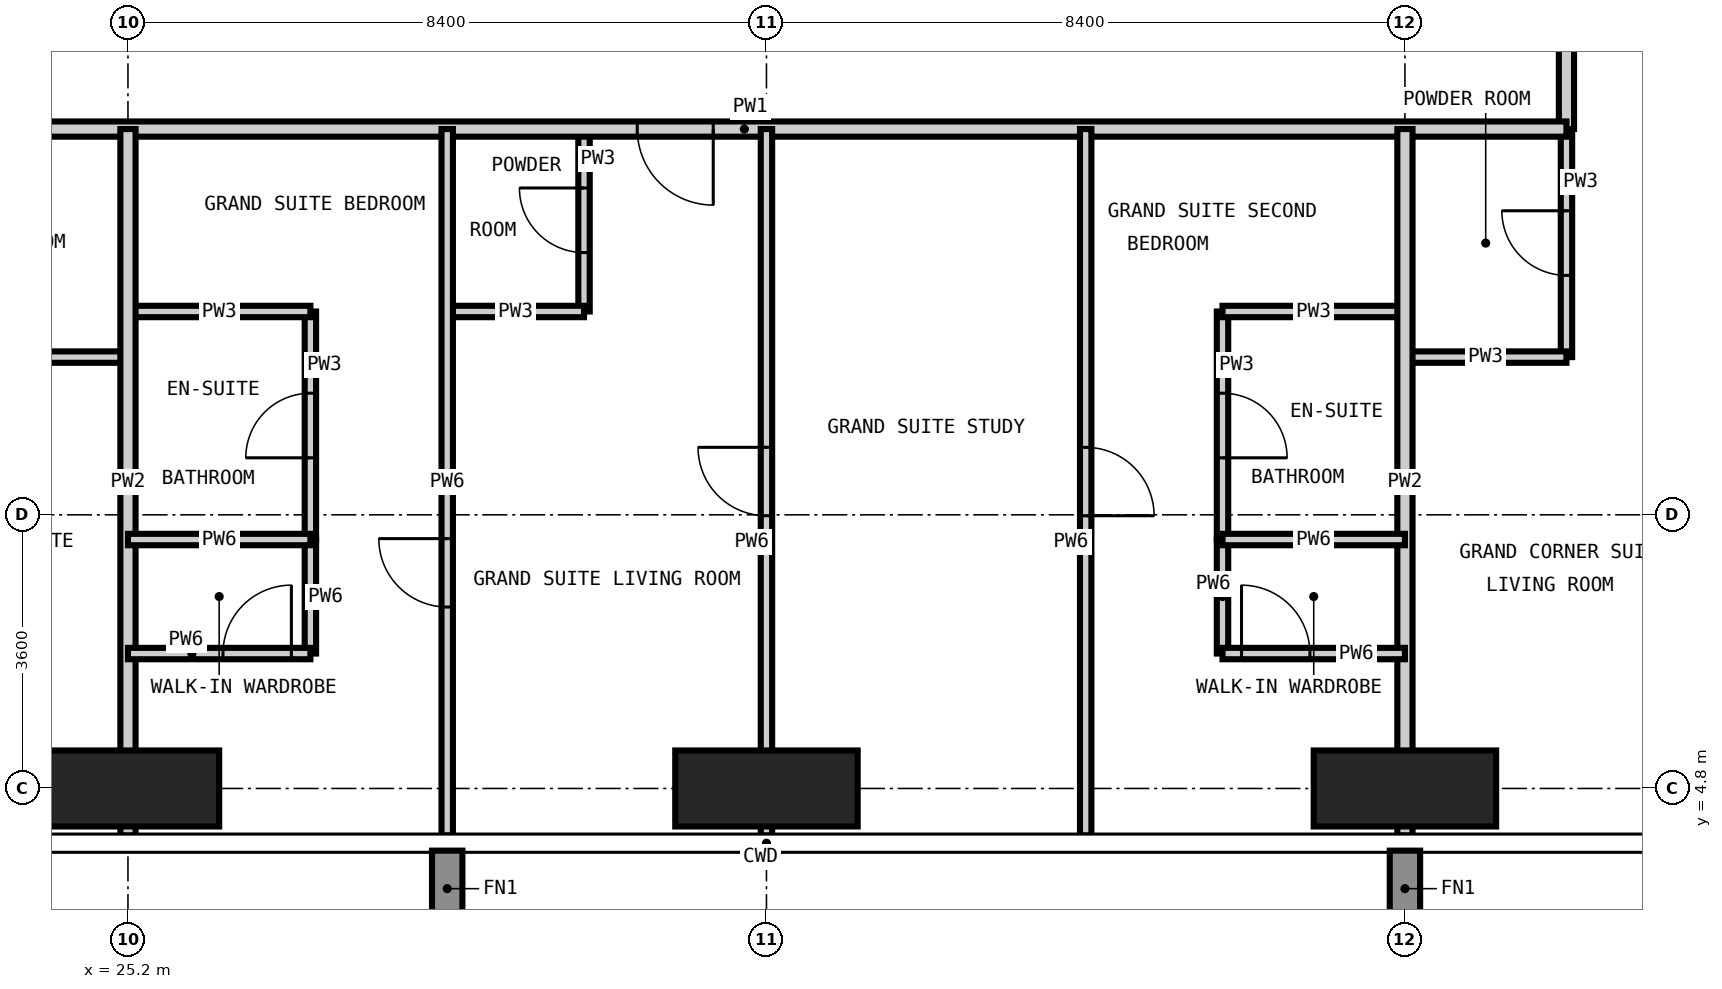
"""IFC4 building model, lengths in metres.
Left out: names, types, materials, properties, quantities, classifications, styles, units other than length and angle.
Written with IfcOpenShell. Run it as: python <this file> out.ifc"""

import sys

from ifc_helpers import new_model, si_unit, direction, frame, frame_2d, origin, origin_2d, place, context, subcontext, project, spatial, rectangle, extrude, element, fill, save


model = new_model("IFC4")
c1 = context("Model", 3, precision=1e-05, world=origin(), true_north=direction((0.0, 1.0)))
c2 = subcontext(c1, "Body", "Model", "MODEL_VIEW")
j1 = project(units=[si_unit("LENGTHUNIT", "METRE"), si_unit("PLANEANGLEUNIT", "RADIAN")], contexts=[c1])
p1 = place(None, origin())
s1 = spatial("IfcSite", under=j1, at=p1, CompositionType="ELEMENT")
p2 = place(p1, origin())
s2 = spatial("IfcBuilding", under=s1, at=p2, CompositionType="ELEMENT")
p3 = place(p2, frame((0.0, 0.0, 276.3)))
s3 = spatial("IfcBuildingStorey", under=s2, at=p3, CompositionType="ELEMENT", Elevation=276.3)
for number, where, z_axis, x_axis in (
    (1, (25.2, 4.8, -0.35), (0.0, 0.0, 1.0), (1.0, 0.0, 0.0)),
    (2, (33.6, 4.8, -0.35), (0.0, 0.0, 1.0), (1.0, 0.0, 0.0)),
    (3, (42.0, 4.8, -0.35), (0.0, 0.0, 1.0), (1.0, 0.0, 0.0)),
):
    element("IfcColumn", number, at=place(p3, frame(where, z_axis=z_axis, x_axis=x_axis)), inside=s3, PredefinedType="COLUMN", context=c2, shape_type="SweptSolid", body=[
        extrude(rectangle(XDim=2.4, YDim=1.0, at=origin_2d()), origin(), (0.0, 0.0, 1.0), 3.9),
    ])
p4 = place(p3, frame((27.6, 8.075, 0.0), z_axis=(0.0, 0.0, 1.0), x_axis=(0.0, 1.0, 0.0)))
e4 = element("IfcWall", 4, at=p4, inside=s3, PredefinedType="PARTITIONING", context=c2, shape_type="SweptSolid", body=[
    extrude(rectangle(XDim=3.0, YDim=0.15, at=frame_2d((1.5, 0.0))), origin(), (0.0, 0.0, 1.0), 3.55),
])
p5 = place(p4, frame((1.075, 0.0, 0.0)))
e5 = element("IfcOpeningElement", 5, at=p5, cuts=e4, PredefinedType="OPENING", context=c2, shape_type="SweptSolid", body=[
    extrude(rectangle(XDim=0.85, YDim=2.1, at=frame_2d((0.425, 1.05))), frame((0.0, 0.085, 0.0), z_axis=(0.0, -1.0, 0.0), x_axis=(1.0, 0.0, 0.0)), (0.0, 0.0, 1.0), 0.17),
])
p6 = place(p3, frame((31.2, 11.075, 0.0), z_axis=(0.0, 0.0, 1.0), x_axis=(0.0, 1.0, 0.0)))
e6 = element("IfcWall", 6, at=p6, inside=s3, PredefinedType="PARTITIONING", context=c2, shape_type="SweptSolid", body=[
    extrude(rectangle(XDim=2.4, YDim=0.15, at=frame_2d((1.2, 0.0))), origin(), (0.0, 0.0, 1.0), 3.55),
])
p7 = place(p6, frame((0.775, 0.0, 0.0)))
e7 = element("IfcOpeningElement", 7, at=p7, cuts=e6, PredefinedType="OPENING", context=c2, shape_type="SweptSolid", body=[
    extrude(rectangle(XDim=0.85, YDim=2.1, at=frame_2d((0.425, 1.05))), frame((0.0, 0.085, 0.0), z_axis=(0.0, -1.0, 0.0), x_axis=(1.0, 0.0, 0.0)), (0.0, 0.0, 1.0), 0.17),
])
p8 = place(p3, frame((39.6, 8.075, 0.0), z_axis=(0.0, 0.0, 1.0), x_axis=(0.0, 1.0, 0.0)))
e8 = element("IfcWall", 8, at=p8, inside=s3, PredefinedType="PARTITIONING", context=c2, shape_type="SweptSolid", body=[
    extrude(rectangle(XDim=3.0, YDim=0.15, at=frame_2d((1.5, 0.0))), origin(), (0.0, 0.0, 1.0), 3.55),
])
p9 = place(p8, frame((1.075, 0.0, 0.0)))
e9 = element("IfcOpeningElement", 9, at=p9, cuts=e8, PredefinedType="OPENING", context=c2, shape_type="SweptSolid", body=[
    extrude(rectangle(XDim=0.85, YDim=2.1, at=frame_2d((0.425, 1.05))), frame((0.0, 0.085, 0.0), z_axis=(0.0, -1.0, 0.0), x_axis=(1.0, 0.0, 0.0)), (0.0, 0.0, 1.0), 0.17),
])
p10 = place(p3, frame((44.125, 10.475, 0.0), z_axis=(0.0, 0.0, 1.0), x_axis=(0.0, 1.0, 0.0)))
e10 = element("IfcWall", 10, at=p10, inside=s3, PredefinedType="PARTITIONING", context=c2, shape_type="SweptSolid", body=[
    extrude(rectangle(XDim=3.0, YDim=0.15, at=frame_2d((1.5, 0.0))), origin(), (0.0, 0.0, 1.0), 3.55),
])
p11 = place(p10, frame((1.075, 0.0, 0.0)))
e11 = element("IfcOpeningElement", 11, at=p11, cuts=e10, PredefinedType="OPENING", context=c2, shape_type="SweptSolid", body=[
    extrude(rectangle(XDim=0.85, YDim=2.1, at=frame_2d((0.425, 1.05))), frame((0.0, 0.085, 0.0), z_axis=(0.0, -1.0, 0.0), x_axis=(1.0, 0.0, 0.0)), (0.0, 0.0, 1.0), 0.17),
])
p12 = place(p3, frame((21.875, 10.475, 0.0), z_axis=(0.0, 0.0, 1.0), x_axis=(1.0, 0.0, 0.0)))
e12 = element("IfcWall", 12, at=p12, inside=s3, PredefinedType="PARTITIONING", context=c2, shape_type="SweptSolid", body=[
    extrude(rectangle(XDim=3.325, YDim=0.15, at=frame_2d((1.663, 0.0))), origin(), (0.0, 0.0, 1.0), 3.55),
])
p13 = place(p12, frame((1.238, 0.0, 0.0)))
e13 = element("IfcOpeningElement", 13, at=p13, cuts=e12, PredefinedType="OPENING", context=c2, shape_type="SweptSolid", body=[
    extrude(rectangle(XDim=0.85, YDim=2.1, at=frame_2d((0.425, 1.05))), frame((0.0, 0.085, 0.0), z_axis=(0.0, -1.0, 0.0), x_axis=(1.0, 0.0, 0.0)), (0.0, 0.0, 1.0), 0.17),
])
p14 = place(p3, frame((42.0, 10.475, 0.0), z_axis=(0.0, 0.0, 1.0), x_axis=(1.0, 0.0, 0.0)))
e14 = element("IfcWall", 14, at=p14, inside=s3, PredefinedType="PARTITIONING", context=c2, shape_type="SweptSolid", body=[
    extrude(rectangle(XDim=2.125, YDim=0.15, at=frame_2d((1.062, 0.0))), origin(), (0.0, 0.0, 1.0), 3.55),
])
p15 = place(p3, frame((25.2, 11.075, 0.0), z_axis=(0.0, 0.0, 1.0), x_axis=(1.0, 0.0, 0.0)))
e15 = element("IfcWall", 15, at=p15, inside=s3, PredefinedType="PARTITIONING", context=c2, shape_type="SweptSolid", body=[
    extrude(rectangle(XDim=2.4, YDim=0.15, at=frame_2d((1.2, 0.0))), origin(), (0.0, 0.0, 1.0), 3.55),
])
p16 = place(p3, frame((29.4, 11.075, 0.0), z_axis=(0.0, 0.0, 1.0), x_axis=(1.0, 0.0, 0.0)))
e16 = element("IfcWall", 16, at=p16, inside=s3, PredefinedType="PARTITIONING", context=c2, shape_type="SweptSolid", body=[
    extrude(rectangle(XDim=1.8, YDim=0.15, at=frame_2d((0.9, 0.0))), origin(), (0.0, 0.0, 1.0), 3.55),
])
p17 = place(p3, frame((39.6, 11.075, 0.0), z_axis=(0.0, 0.0, 1.0), x_axis=(1.0, 0.0, 0.0)))
e17 = element("IfcWall", 17, at=p17, inside=s3, PredefinedType="PARTITIONING", context=c2, shape_type="SweptSolid", body=[
    extrude(rectangle(XDim=2.4, YDim=0.15, at=frame_2d((1.2, 0.0))), origin(), (0.0, 0.0, 1.0), 3.55),
])
p18 = place(p3, frame((44.125, 25.2, 0.0), z_axis=(0.0, 0.0, 1.0), x_axis=(0.0, -1.0, 0.0)))
e18 = element("IfcWall", 18, at=p18, inside=s3, PredefinedType="PARTITIONING", context=c2, shape_type="SweptSolid", body=[
    extrude(rectangle(XDim=11.725, YDim=0.2, at=frame_2d((5.862, 0.0))), origin(), (0.0, 0.0, 1.0), 3.55),
])
p19 = place(p18, frame((3.7, 0.0, 0.0)))
e19 = element("IfcOpeningElement", 19, at=p19, cuts=e18, PredefinedType="OPENING", context=c2, shape_type="SweptSolid", body=[
    extrude(rectangle(XDim=1.0, YDim=2.2, at=frame_2d((0.5, 1.1))), frame((0.0, 0.11, 0.0), z_axis=(0.0, -1.0, 0.0), x_axis=(1.0, 0.0, 0.0)), (0.0, 0.0, 1.0), 0.22),
])
p20 = place(p18, frame((9.563, 0.0, 0.0)))
e20 = element("IfcOpeningElement", 20, at=p20, cuts=e18, PredefinedType="OPENING", context=c2, shape_type="SweptSolid", body=[
    extrude(rectangle(XDim=1.0, YDim=2.2, at=frame_2d((0.5, 1.1))), frame((0.0, 0.11, 0.0), z_axis=(0.0, -1.0, 0.0), x_axis=(1.0, 0.0, 0.0)), (0.0, 0.0, 1.0), 0.22),
])
p21 = place(p3, frame((44.125, 13.475, 0.0), z_axis=(0.0, 0.0, 1.0), x_axis=(-1.0, 0.0, 0.0)))
e21 = element("IfcWall", 21, at=p21, inside=s3, PredefinedType="PARTITIONING", context=c2, shape_type="SweptSolid", body=[
    extrude(rectangle(XDim=22.25, YDim=0.2, at=frame_2d((11.125, 0.0))), origin(), (0.0, 0.0, 1.0), 3.55),
])
p22 = place(p21, frame((11.225, 0.0, 0.0)))
e22 = element("IfcOpeningElement", 22, at=p22, cuts=e21, PredefinedType="OPENING", context=c2, shape_type="SweptSolid", body=[
    extrude(rectangle(XDim=1.0, YDim=2.2, at=frame_2d((0.5, 1.1))), frame((0.0, 0.11, 0.0), z_axis=(0.0, -1.0, 0.0), x_axis=(1.0, 0.0, 0.0)), (0.0, 0.0, 1.0), 0.22),
])
for number, where, z_axis, x_axis in (
    (23, (25.2, 4.182, 0.0), (0.0, 0.0, 1.0), (0.0, 1.0, 0.0)),
    (24, (42.0, 4.182, 0.0), (0.0, 0.0, 1.0), (0.0, 1.0, 0.0)),
):
    element("IfcWall", number, at=place(p3, frame(where, z_axis=z_axis, x_axis=x_axis)), inside=s3, PredefinedType="PARTITIONING", context=c2, shape_type="SweptSolid", body=[
        extrude(rectangle(XDim=9.293, YDim=0.2, at=frame_2d((4.646, 0.0))), origin(), (0.0, 0.0, 1.0), 3.55),
    ])
p23 = place(p3, frame((27.6, 6.575, 0.0), z_axis=(0.0, 0.0, 1.0), x_axis=(0.0, 1.0, 0.0)))
e25 = element("IfcWall", 25, at=p23, inside=s3, PredefinedType="PARTITIONING", context=c2, shape_type="SweptSolid", body=[
    extrude(rectangle(XDim=1.5, YDim=0.15, at=frame_2d((0.75, 0.0))), origin(), (0.0, 0.0, 1.0), 3.55),
])
p24 = place(p3, frame((29.4, 4.182, 0.0), z_axis=(0.0, 0.0, 1.0), x_axis=(0.0, 1.0, 0.0)))
e26 = element("IfcWall", 26, at=p24, inside=s3, PredefinedType="PARTITIONING", context=c2, shape_type="SweptSolid", body=[
    extrude(rectangle(XDim=9.293, YDim=0.15, at=frame_2d((4.646, 0.0))), origin(), (0.0, 0.0, 1.0), 3.55),
])
p25 = place(p24, frame((3.005, 0.0, 0.0)))
e27 = element("IfcOpeningElement", 27, at=p25, cuts=e26, PredefinedType="OPENING", context=c2, shape_type="SweptSolid", body=[
    extrude(rectangle(XDim=0.9, YDim=2.1, at=frame_2d((0.45, 1.05))), frame((0.0, 0.085, 0.0), z_axis=(0.0, -1.0, 0.0), x_axis=(1.0, 0.0, 0.0)), (0.0, 0.0, 1.0), 0.17),
])
p26 = place(p3, frame((33.6, 4.182, 0.0), z_axis=(0.0, 0.0, 1.0), x_axis=(0.0, 1.0, 0.0)))
e28 = element("IfcWall", 28, at=p26, inside=s3, PredefinedType="PARTITIONING", context=c2, shape_type="SweptSolid", body=[
    extrude(rectangle(XDim=9.293, YDim=0.15, at=frame_2d((4.646, 0.0))), origin(), (0.0, 0.0, 1.0), 3.55),
])
p27 = place(p26, frame((4.206, 0.0, 0.0)))
e29 = element("IfcOpeningElement", 29, at=p27, cuts=e28, PredefinedType="OPENING", context=c2, shape_type="SweptSolid", body=[
    extrude(rectangle(XDim=0.9, YDim=2.1, at=frame_2d((0.45, 1.05))), frame((0.0, 0.085, 0.0), z_axis=(0.0, -1.0, 0.0), x_axis=(1.0, 0.0, 0.0)), (0.0, 0.0, 1.0), 0.17),
])
p28 = place(p3, frame((37.8, 4.182, 0.0), z_axis=(0.0, 0.0, 1.0), x_axis=(0.0, 1.0, 0.0)))
e30 = element("IfcWall", 30, at=p28, inside=s3, PredefinedType="PARTITIONING", context=c2, shape_type="SweptSolid", body=[
    extrude(rectangle(XDim=9.293, YDim=0.15, at=frame_2d((4.646, 0.0))), origin(), (0.0, 0.0, 1.0), 3.55),
])
p29 = place(p28, frame((4.206, 0.0, 0.0)))
e31 = element("IfcOpeningElement", 31, at=p29, cuts=e30, PredefinedType="OPENING", context=c2, shape_type="SweptSolid", body=[
    extrude(rectangle(XDim=0.9, YDim=2.1, at=frame_2d((0.45, 1.05))), frame((0.0, 0.085, 0.0), z_axis=(0.0, -1.0, 0.0), x_axis=(1.0, 0.0, 0.0)), (0.0, 0.0, 1.0), 0.17),
])
p30 = place(p3, frame((39.6, 6.575, 0.0), z_axis=(0.0, 0.0, 1.0), x_axis=(0.0, 1.0, 0.0)))
e32 = element("IfcWall", 32, at=p30, inside=s3, PredefinedType="PARTITIONING", context=c2, shape_type="SweptSolid", body=[
    extrude(rectangle(XDim=1.5, YDim=0.15, at=frame_2d((0.75, 0.0))), origin(), (0.0, 0.0, 1.0), 3.55),
])
p31 = place(p3, frame((25.2, 6.575, 0.0), z_axis=(0.0, 0.0, 1.0), x_axis=(1.0, 0.0, 0.0)))
e33 = element("IfcWall", 33, at=p31, inside=s3, PredefinedType="PARTITIONING", context=c2, shape_type="SweptSolid", body=[
    extrude(rectangle(XDim=2.4, YDim=0.15, at=frame_2d((1.2, 0.0))), origin(), (0.0, 0.0, 1.0), 3.55),
])
p32 = place(p31, frame((1.25, 0.0, 0.0)))
e34 = element("IfcOpeningElement", 34, at=p32, cuts=e33, PredefinedType="OPENING", context=c2, shape_type="SweptSolid", body=[
    extrude(rectangle(XDim=0.9, YDim=2.1, at=frame_2d((0.45, 1.05))), frame((0.0, 0.085, 0.0), z_axis=(0.0, -1.0, 0.0), x_axis=(1.0, 0.0, 0.0)), (0.0, 0.0, 1.0), 0.17),
])
p33 = place(p3, frame((39.6, 6.575, 0.0), z_axis=(0.0, 0.0, 1.0), x_axis=(1.0, 0.0, 0.0)))
e35 = element("IfcWall", 35, at=p33, inside=s3, PredefinedType="PARTITIONING", context=c2, shape_type="SweptSolid", body=[
    extrude(rectangle(XDim=2.4, YDim=0.15, at=frame_2d((1.2, 0.0))), origin(), (0.0, 0.0, 1.0), 3.55),
])
p34 = place(p33, frame((0.25, 0.0, 0.0)))
e36 = element("IfcOpeningElement", 36, at=p34, cuts=e35, PredefinedType="OPENING", context=c2, shape_type="SweptSolid", body=[
    extrude(rectangle(XDim=0.9, YDim=2.1, at=frame_2d((0.45, 1.05))), frame((0.0, 0.085, 0.0), z_axis=(0.0, -1.0, 0.0), x_axis=(1.0, 0.0, 0.0)), (0.0, 0.0, 1.0), 0.17),
])
p35 = place(p3, frame((25.2, 8.075, 0.0), z_axis=(0.0, 0.0, 1.0), x_axis=(1.0, 0.0, 0.0)))
e37 = element("IfcWall", 37, at=p35, inside=s3, PredefinedType="PARTITIONING", context=c2, shape_type="SweptSolid", body=[
    extrude(rectangle(XDim=2.4, YDim=0.15, at=frame_2d((1.2, 0.0))), origin(), (0.0, 0.0, 1.0), 3.55),
])
p36 = place(p3, frame((39.6, 8.075, 0.0), z_axis=(0.0, 0.0, 1.0), x_axis=(1.0, 0.0, 0.0)))
e38 = element("IfcWall", 38, at=p36, inside=s3, PredefinedType="PARTITIONING", context=c2, shape_type="SweptSolid", body=[
    extrude(rectangle(XDim=2.4, YDim=0.15, at=frame_2d((1.2, 0.0))), origin(), (0.0, 0.0, 1.0), 3.55),
])
p37 = place(p22, origin())
e39 = element("IfcDoor", 39, at=p37, inside=s3, OperationType="SINGLE_SWING_LEFT", PredefinedType="DOOR", context=c2, shape_type="SweptSolid", body=[
    extrude(rectangle(XDim=1.0, YDim=2.2, at=frame_2d((0.5, 1.1))), frame((0.0, 0.025, 0.0), z_axis=(0.0, -1.0, 0.0), x_axis=(1.0, 0.0, 0.0)), (0.0, 0.0, 1.0), 0.05),
])
fill(e22, e39)
p38 = place(p7, origin())
e40 = element("IfcDoor", 40, at=p38, inside=s3, OperationType="SINGLE_SWING_RIGHT", PredefinedType="DOOR", context=c2, shape_type="SweptSolid", body=[
    extrude(rectangle(XDim=0.85, YDim=2.1, at=frame_2d((0.425, 1.05))), frame((0.0, 0.025, 0.0), z_axis=(0.0, -1.0, 0.0), x_axis=(1.0, 0.0, 0.0)), (0.0, 0.0, 1.0), 0.05),
])
fill(e7, e40)
p39 = place(p25, origin())
e41 = element("IfcDoor", 41, at=p39, inside=s3, OperationType="SINGLE_SWING_RIGHT", PredefinedType="DOOR", context=c2, shape_type="SweptSolid", body=[
    extrude(rectangle(XDim=0.9, YDim=2.1, at=frame_2d((0.45, 1.05))), frame((0.0, 0.025, 0.0), z_axis=(0.0, -1.0, 0.0), x_axis=(1.0, 0.0, 0.0)), (0.0, 0.0, 1.0), 0.05),
])
fill(e27, e41)
p40 = place(p5, origin())
e42 = element("IfcDoor", 42, at=p40, inside=s3, OperationType="SINGLE_SWING_LEFT", PredefinedType="DOOR", context=c2, shape_type="SweptSolid", body=[
    extrude(rectangle(XDim=0.85, YDim=2.1, at=frame_2d((0.425, 1.05))), frame((0.0, 0.025, 0.0), z_axis=(0.0, -1.0, 0.0), x_axis=(1.0, 0.0, 0.0)), (0.0, 0.0, 1.0), 0.05),
])
fill(e5, e42)
p41 = place(p32, origin())
e43 = element("IfcDoor", 43, at=p41, inside=s3, OperationType="SINGLE_SWING_RIGHT", PredefinedType="DOOR", context=c2, shape_type="SweptSolid", body=[
    extrude(rectangle(XDim=0.9, YDim=2.1, at=frame_2d((0.45, 1.05))), frame((0.0, 0.025, 0.0), z_axis=(0.0, -1.0, 0.0), x_axis=(1.0, 0.0, 0.0)), (0.0, 0.0, 1.0), 0.05),
])
fill(e34, e43)
p42 = place(p27, origin())
e44 = element("IfcDoor", 44, at=p42, inside=s3, OperationType="SINGLE_SWING_RIGHT", PredefinedType="DOOR", context=c2, shape_type="SweptSolid", body=[
    extrude(rectangle(XDim=0.9, YDim=2.1, at=frame_2d((0.45, 1.05))), frame((0.0, 0.025, 0.0), z_axis=(0.0, -1.0, 0.0), x_axis=(1.0, 0.0, 0.0)), (0.0, 0.0, 1.0), 0.05),
])
fill(e29, e44)
p43 = place(p29, frame((0.9, 0.0, 0.0), z_axis=(0.0, 0.0, 1.0), x_axis=(-1.0, 0.0, 0.0)))
e45 = element("IfcDoor", 45, at=p43, inside=s3, OperationType="SINGLE_SWING_RIGHT", PredefinedType="DOOR", context=c2, shape_type="SweptSolid", body=[
    extrude(rectangle(XDim=0.9, YDim=2.1, at=frame_2d((0.45, 1.05))), frame((0.0, 0.025, 0.0), z_axis=(0.0, -1.0, 0.0), x_axis=(1.0, 0.0, 0.0)), (0.0, 0.0, 1.0), 0.05),
])
fill(e31, e45)
p44 = place(p9, frame((0.85, 0.0, 0.0), z_axis=(0.0, 0.0, 1.0), x_axis=(-1.0, 0.0, 0.0)))
e46 = element("IfcDoor", 46, at=p44, inside=s3, OperationType="SINGLE_SWING_RIGHT", PredefinedType="DOOR", context=c2, shape_type="SweptSolid", body=[
    extrude(rectangle(XDim=0.85, YDim=2.1, at=frame_2d((0.425, 1.05))), frame((0.0, 0.025, 0.0), z_axis=(0.0, -1.0, 0.0), x_axis=(1.0, 0.0, 0.0)), (0.0, 0.0, 1.0), 0.05),
])
fill(e9, e46)
p45 = place(p34, origin())
e47 = element("IfcDoor", 47, at=p45, inside=s3, OperationType="SINGLE_SWING_LEFT", PredefinedType="DOOR", context=c2, shape_type="SweptSolid", body=[
    extrude(rectangle(XDim=0.9, YDim=2.1, at=frame_2d((0.45, 1.05))), frame((0.0, 0.025, 0.0), z_axis=(0.0, -1.0, 0.0), x_axis=(1.0, 0.0, 0.0)), (0.0, 0.0, 1.0), 0.05),
])
fill(e36, e47)
p46 = place(p11, origin())
e48 = element("IfcDoor", 48, at=p46, inside=s3, OperationType="SINGLE_SWING_RIGHT", PredefinedType="DOOR", context=c2, shape_type="SweptSolid", body=[
    extrude(rectangle(XDim=0.85, YDim=2.1, at=frame_2d((0.425, 1.05))), frame((0.0, 0.025, 0.0), z_axis=(0.0, -1.0, 0.0), x_axis=(1.0, 0.0, 0.0)), (0.0, 0.0, 1.0), 0.05),
])
fill(e11, e48)
save(model, sys.argv[1])
